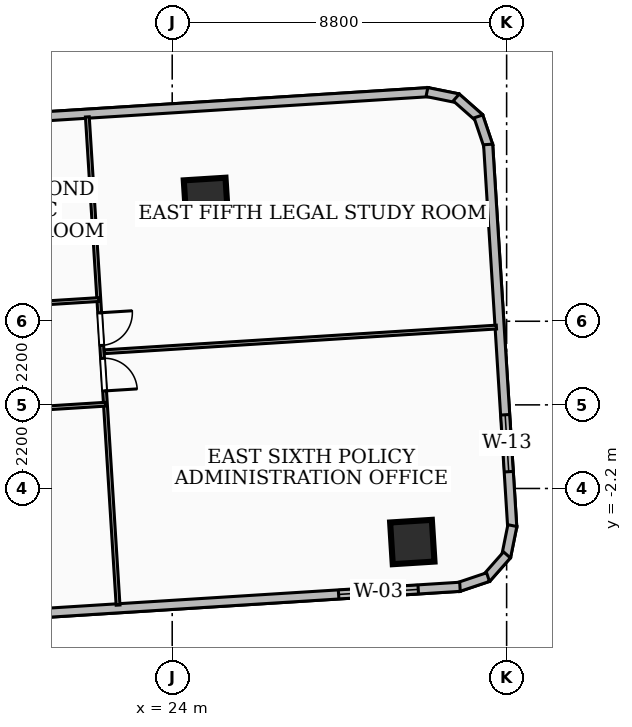
"""IFC4 building model, lengths in metres.
Left out: names, types, materials, properties, quantities, classifications, styles, units other than length and angle.
Written with IfcOpenShell. Run it as: python <this file> out.ifc"""

import sys

from ifc_helpers import new_model, si_unit, direction, frame, frame_2d, origin, origin_2d, place, context, subcontext, project, spatial, rectangle, extrude, element, fill, save


model = new_model("IFC4")
c1 = context("Model", 3, precision=1e-05, world=origin(), true_north=direction((0.0, 1.0)))
c2 = subcontext(c1, "Body", "Model", "MODEL_VIEW")
j1 = project(units=[si_unit("LENGTHUNIT", "METRE"), si_unit("PLANEANGLEUNIT", "RADIAN")], contexts=[c1])
p1 = place(None, origin())
s1 = spatial("IfcSite", under=j1, at=p1, CompositionType="ELEMENT")
p2 = place(p1, origin())
s2 = spatial("IfcBuilding", under=s1, at=p2, CompositionType="ELEMENT")
p3 = place(p2, frame((0.0, 0.0, 53.28)))
s3 = spatial("IfcBuildingStorey", under=s2, at=p3, CompositionType="ELEMENT", Elevation=53.28)
for number, where, z_axis, x_axis in (
    (1, (30.318, -3.609, 0.0), (0.0, 0.0, 1.0), (0.998, 0.063, 0.0)),
    (2, (24.888, 5.393, 0.0), (0.0, 0.0, 1.0), (0.998, 0.063, 0.0)),
):
    element("IfcColumn", number, at=place(p3, frame(where, z_axis=z_axis, x_axis=x_axis)), inside=s3, PredefinedType="COLUMN", context=c2, shape_type="SweptSolid", body=[
        extrude(rectangle(XDim=1.1, YDim=1.1, at=origin_2d()), origin(), (0.0, 0.0, 1.0), 3.6),
    ])
p4 = place(p3, frame((13.911, 7.167, 0.0), z_axis=(0.0, 0.0, 1.0), x_axis=(0.99802143782, 0.062874554885, 0.0)))
e3 = element("IfcWall", 3, at=p4, inside=s3, PredefinedType="SOLIDWALL", context=c2, shape_type="SweptSolid", body=[
    extrude(rectangle(XDim=16.875, YDim=0.24, at=frame_2d((8.438, 0.0))), origin(), (0.0, 0.0, 1.0), 3.32),
])
p5 = place(p4, frame((4.4, 0.0, 0.0)))
e4 = element("IfcOpeningElement", 4, at=p5, cuts=e3, PredefinedType="OPENING", context=c2, shape_type="SweptSolid", body=[
    extrude(rectangle(XDim=1.1, YDim=2.1, at=frame_2d((0.55, 1.05))), frame((0.0, 0.13, 0.0), z_axis=(0.0, -1.0, 0.0), x_axis=(1.0, 0.0, 0.0)), (0.0, 0.0, 1.0), 0.26),
])
p6 = place(p3, frame((30.703, 8.231, 0.0), z_axis=(0.0, 0.0, 1.0), x_axis=(0.980115061473, -0.198430003461, 0.0)))
e5 = element("IfcWall", 5, at=p6, inside=s3, PredefinedType="SOLIDWALL", context=c2, shape_type="SweptSolid", body=[
    extrude(rectangle(XDim=0.832, YDim=0.24, at=frame_2d((0.416, 0.0))), origin(), (0.0, 0.0, 1.0), 3.32),
])
p7 = place(p3, frame((31.474, 8.088, 0.0), z_axis=(0.0, 0.0, 1.0), x_axis=(0.749934065497, -0.661512582954, 0.0)))
e6 = element("IfcWall", 6, at=p7, inside=s3, PredefinedType="SOLIDWALL", context=c2, shape_type="SweptSolid", body=[
    extrude(rectangle(XDim=0.814, YDim=0.24, at=frame_2d((0.407, 0.0))), origin(), (0.0, 0.0, 1.0), 3.32),
])
p8 = place(p3, frame((32.058, 7.59, 0.0), z_axis=(0.0, 0.0, 1.0), x_axis=(0.318960399163, -0.947768043229, 0.0)))
e7 = element("IfcWall", 7, at=p8, inside=s3, PredefinedType="SOLIDWALL", context=c2, shape_type="SweptSolid", body=[
    extrude(rectangle(XDim=0.831, YDim=0.24, at=frame_2d((0.415, 0.0))), origin(), (0.0, 0.0, 1.0), 3.32),
])
p9 = place(p3, frame((32.313, 6.852, 0.0), z_axis=(0.0, 0.0, 1.0), x_axis=(0.062877947964, -0.998021224053, 0.0)))
e8 = element("IfcWall", 8, at=p9, inside=s3, PredefinedType="SOLIDWALL", context=c2, shape_type="SweptSolid", body=[
    extrude(rectangle(XDim=10.099, YDim=0.24, at=frame_2d((5.05, 0.0))), origin(), (0.0, 0.0, 1.0), 3.32),
])
p10 = place(p9, frame((7.127, 0.0, 0.85)))
e9 = element("IfcOpeningElement", 9, at=p10, cuts=e8, PredefinedType="OPENING", context=c2, shape_type="SweptSolid", body=[
    extrude(rectangle(XDim=1.5, YDim=1.8, at=frame_2d((0.75, 0.9))), frame((0.0, 0.13, 0.0), z_axis=(0.0, -1.0, 0.0), x_axis=(1.0, 0.0, 0.0)), (0.0, 0.0, 1.0), 0.26),
])
p11 = place(p3, frame((32.951, -3.177, 0.0), z_axis=(0.0, 0.0, 1.0), x_axis=(-0.197076231398, -0.980388167522, 0.0)))
e10 = element("IfcWall", 10, at=p11, inside=s3, PredefinedType="SOLIDWALL", context=c2, shape_type="SweptSolid", body=[
    extrude(rectangle(XDim=0.831, YDim=0.24, at=frame_2d((0.416, 0.0))), origin(), (0.0, 0.0, 1.0), 3.32),
])
p12 = place(p3, frame((32.809, -3.948, 0.0), z_axis=(0.0, 0.0, 1.0), x_axis=(-0.661532449753, -0.749916540639, 0.0)))
e11 = element("IfcWall", 11, at=p12, inside=s3, PredefinedType="SOLIDWALL", context=c2, shape_type="SweptSolid", body=[
    extrude(rectangle(XDim=0.815, YDim=0.24, at=frame_2d((0.407, 0.0))), origin(), (0.0, 0.0, 1.0), 3.32),
])
p13 = place(p3, frame((32.311, -4.532, 0.0), z_axis=(0.0, 0.0, 1.0), x_axis=(-0.94779876374, -0.318869100812, 0.0)))
e12 = element("IfcWall", 12, at=p13, inside=s3, PredefinedType="SOLIDWALL", context=c2, shape_type="SweptSolid", body=[
    extrude(rectangle(XDim=0.832, YDim=0.24, at=frame_2d((0.416, 0.0))), origin(), (0.0, 0.0, 1.0), 3.32),
])
p14 = place(p3, frame((31.572, -4.787, 0.0), z_axis=(0.0, 0.0, 1.0), x_axis=(-0.998025974342, -0.062802504235, 0.0)))
e13 = element("IfcWall", 13, at=p14, inside=s3, PredefinedType="SOLIDWALL", context=c2, shape_type="SweptSolid", body=[
    extrude(rectangle(XDim=16.875, YDim=0.24, at=frame_2d((8.438, 0.0))), origin(), (0.0, 0.0, 1.0), 3.32),
])
p15 = place(p14, frame((1.1, 0.0, 0.85)))
e14 = element("IfcOpeningElement", 14, at=p15, cuts=e13, PredefinedType="OPENING", context=c2, shape_type="SweptSolid", body=[
    extrude(rectangle(XDim=2.1, YDim=2.0, at=frame_2d((1.05, 1.0))), frame((0.0, 0.13, 0.0), z_axis=(0.0, -1.0, 0.0), x_axis=(1.0, 0.0, 0.0)), (0.0, 0.0, 1.0), 0.26),
])
p16 = place(p3, frame((22.07, 2.771, 0.0), z_axis=(0.0, 0.0, 1.0), x_axis=(-0.998031627252, -0.062712606425, 0.0)))
e15 = element("IfcWall", 15, at=p16, inside=s3, PredefinedType="PARTITIONING", context=c2, shape_type="SweptSolid", body=[
    extrude(rectangle(XDim=7.911, YDim=0.1, at=frame_2d((3.955, 0.0))), origin(), (0.0, 0.0, 1.0), 3.32),
])
p17 = place(p16, frame((6.096, 0.0, 0.0)))
e16 = element("IfcOpeningElement", 16, at=p17, cuts=e15, PredefinedType="OPENING", context=c2, shape_type="SweptSolid", body=[
    extrude(rectangle(XDim=0.86, YDim=2.04, at=frame_2d((0.43, 1.02))), frame((0.0, 0.06, 0.0), z_axis=(0.0, -1.0, 0.0), x_axis=(1.0, 0.0, 0.0)), (0.0, 0.0, 1.0), 0.12),
])
p18 = place(p16, frame((2.141, 0.0, 0.0)))
e17 = element("IfcOpeningElement", 17, at=p18, cuts=e15, PredefinedType="OPENING", context=c2, shape_type="SweptSolid", body=[
    extrude(rectangle(XDim=0.86, YDim=2.04, at=frame_2d((0.43, 1.02))), frame((0.0, 0.06, 0.0), z_axis=(0.0, -1.0, 0.0), x_axis=(1.0, 0.0, 0.0)), (0.0, 0.0, 1.0), 0.12),
])
p19 = place(p3, frame((14.348, -0.48, 0.0), z_axis=(0.0, 0.0, 1.0), x_axis=(0.998023893104, 0.062835569496, 0.0)))
e18 = element("IfcWall", 18, at=p19, inside=s3, PredefinedType="PARTITIONING", context=c2, shape_type="SweptSolid", body=[
    extrude(rectangle(XDim=7.911, YDim=0.1, at=frame_2d((3.955, 0.0))), origin(), (0.0, 0.0, 1.0), 3.32),
])
p20 = place(p19, frame((3.475, 0.0, 0.0)))
e19 = element("IfcOpeningElement", 19, at=p20, cuts=e18, PredefinedType="OPENING", context=c2, shape_type="SweptSolid", body=[
    extrude(rectangle(XDim=0.9, YDim=2.06, at=frame_2d((0.45, 1.03))), frame((0.0, 0.06, 0.0), z_axis=(0.0, -1.0, 0.0), x_axis=(1.0, 0.0, 0.0)), (0.0, 0.0, 1.0), 0.12),
])
p21 = place(p3, frame((22.216, 1.398, 0.0), z_axis=(0.0, 0.0, 1.0), x_axis=(0.998025462108, 0.062810643876, 0.0)))
e20 = element("IfcWall", 20, at=p21, inside=s3, PredefinedType="PARTITIONING", context=c2, shape_type="SweptSolid", body=[
    extrude(rectangle(XDim=10.335, YDim=0.1, at=frame_2d((5.168, 0.0))), origin(), (0.0, 0.0, 1.0), 2.812),
])
p22 = place(p3, frame((21.767, 7.577, 0.0), z_axis=(0.0, 0.0, 1.0), x_axis=(0.062769180357, -0.998028070746, 0.0)))
e21 = element("IfcWall", 21, at=p22, inside=s3, PredefinedType="PARTITIONING", context=c2, shape_type="SweptSolid", body=[
    extrude(rectangle(XDim=12.87, YDim=0.1, at=frame_2d((6.435, 0.0))), origin(), (0.0, 0.0, 1.0), 2.401),
])
p23 = place(p22, frame((6.365, 0.0, 0.0)))
e22 = element("IfcOpeningElement", 22, at=p23, cuts=e21, PredefinedType="OPENING", context=c2, shape_type="SweptSolid", body=[
    extrude(rectangle(XDim=0.86, YDim=2.04, at=frame_2d((0.43, 1.02))), frame((0.0, 0.06, 0.0), z_axis=(0.0, -1.0, 0.0), x_axis=(1.0, 0.0, 0.0)), (0.0, 0.0, 1.0), 0.12),
])
p24 = place(p22, frame((5.165, 0.0, 0.0)))
e23 = element("IfcOpeningElement", 23, at=p24, cuts=e21, PredefinedType="OPENING", context=c2, shape_type="SweptSolid", body=[
    extrude(rectangle(XDim=0.86, YDim=2.04, at=frame_2d((0.43, 1.02))), frame((0.0, 0.06, 0.0), z_axis=(0.0, -1.0, 0.0), x_axis=(1.0, 0.0, 0.0)), (0.0, 0.0, 1.0), 0.12),
])
p25 = place(p10, origin())
e24 = element("IfcWindow", 24, at=p25, inside=s3, PartitioningType="SINGLE_PANEL", PredefinedType="WINDOW", context=c2, shape_type="SweptSolid", body=[
    extrude(rectangle(XDim=1.5, YDim=1.8, at=frame_2d((0.75, 0.9))), frame((0.0, 0.03, 0.0), z_axis=(0.0, -1.0, 0.0), x_axis=(1.0, 0.0, 0.0)), (0.0, 0.0, 1.0), 0.06),
])
fill(e9, e24)
p26 = place(p15, origin())
e25 = element("IfcWindow", 25, at=p26, inside=s3, PartitioningType="SINGLE_PANEL", PredefinedType="WINDOW", context=c2, shape_type="SweptSolid", body=[
    extrude(rectangle(XDim=2.1, YDim=2.0, at=frame_2d((1.05, 1.0))), frame((0.0, 0.03, 0.0), z_axis=(0.0, -1.0, 0.0), x_axis=(1.0, 0.0, 0.0)), (0.0, 0.0, 1.0), 0.06),
])
fill(e14, e25)
p27 = place(p23, origin())
e26 = element("IfcDoor", 26, at=p27, inside=s3, OperationType="SINGLE_SWING_RIGHT", PredefinedType="DOOR", context=c2, shape_type="SweptSolid", body=[
    extrude(rectangle(XDim=0.86, YDim=2.04, at=frame_2d((0.43, 1.02))), frame((0.0, 0.025, 0.0), z_axis=(0.0, -1.0, 0.0), x_axis=(1.0, 0.0, 0.0)), (0.0, 0.0, 1.0), 0.05),
])
fill(e22, e26)
p28 = place(p24, origin())
e27 = element("IfcDoor", 27, at=p28, inside=s3, OperationType="SINGLE_SWING_LEFT", PredefinedType="DOOR", context=c2, shape_type="SweptSolid", body=[
    extrude(rectangle(XDim=0.86, YDim=2.04, at=frame_2d((0.43, 1.02))), frame((0.0, 0.025, 0.0), z_axis=(0.0, -1.0, 0.0), x_axis=(1.0, 0.0, 0.0)), (0.0, 0.0, 1.0), 0.05),
])
fill(e23, e27)
save(model, sys.argv[1])
